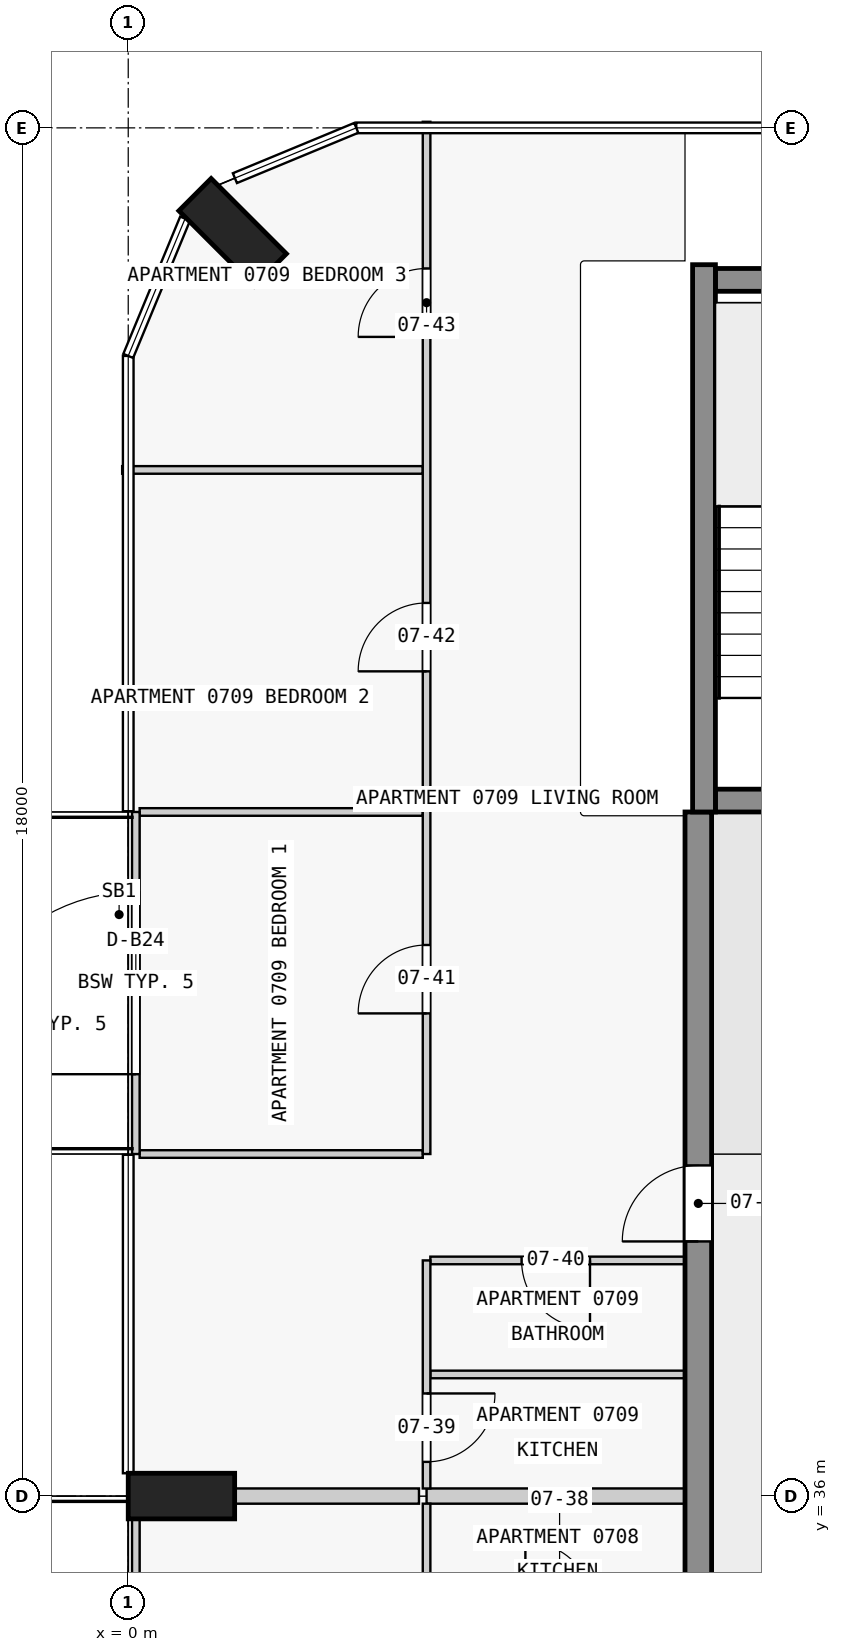
"""IFC4 building model, lengths in metres.
Left out: names, types, materials, properties, quantities, classifications, styles, units other than length and angle.
Written with IfcOpenShell. Run it as: python <this file> out.ifc"""

import sys

from ifc_helpers import new_model, si_unit, direction, frame, frame_2d, origin, origin_2d, place, context, subcontext, project, spatial, rectangle, extrude, element, fill, save


model = new_model("IFC4")
c1 = context("Model", 3, precision=1e-05, world=origin(), true_north=direction((0.0, 1.0)))
c2 = subcontext(c1, "Body", "Model", "MODEL_VIEW")
j1 = project(units=[si_unit("LENGTHUNIT", "METRE"), si_unit("PLANEANGLEUNIT", "RADIAN")], contexts=[c1])
p1 = place(None, origin())
s1 = spatial("IfcSite", under=j1, at=p1, CompositionType="ELEMENT")
p2 = place(p1, origin())
s2 = spatial("IfcBuilding", under=s1, at=p2, CompositionType="ELEMENT")
p3 = place(p2, frame((0.0, 0.0, 33.8)))
s3 = spatial("IfcBuildingStorey", under=s2, at=p3, CompositionType="ELEMENT", Elevation=33.8)
for number, where, z_axis, x_axis in (
    (1, (1.374, 52.626, 0.0), (0.0, 0.0, 1.0), (0.707, 0.707, 0.0)),
    (2, (0.7, 36.0, 0.0), (0.0, 0.0, 1.0), (0.0, 1.0, 0.0)),
):
    element("IfcColumn", number, at=place(p3, frame(where, z_axis=z_axis, x_axis=x_axis)), inside=s3, PredefinedType="COLUMN", context=c2, shape_type="SweptSolid", body=[
        extrude(rectangle(XDim=0.6, YDim=1.4, at=origin_2d()), origin(), (0.0, 0.0, 1.0), 3.5),
    ])
p4 = place(p3, frame((7.725, 45.15, 0.0), z_axis=(0.0, 0.0, 1.0), x_axis=(1.0, 0.0, 0.0)))
e3 = element("IfcWall", 3, at=p4, inside=s3, PredefinedType="SHEAR", context=c2, shape_type="SweptSolid", body=[
    extrude(rectangle(XDim=2.55, YDim=0.3, at=frame_2d((1.275, 0.0))), origin(), (0.0, 0.0, 1.0), 3.5),
])
p5 = place(p4, frame((0.725, 0.0, 0.0)))
e4 = element("IfcOpeningElement", 4, at=p5, cuts=e3, PredefinedType="OPENING", context=c2, shape_type="SweptSolid", body=[
    extrude(rectangle(XDim=1.1, YDim=2.1, at=frame_2d((0.55, 1.05))), frame((0.0, 0.16, 0.0), z_axis=(0.0, -1.0, 0.0), x_axis=(1.0, 0.0, 0.0)), (0.0, 0.0, 1.0), 0.32),
])
p6 = place(p3, frame((7.725, 52.0, 0.0), z_axis=(0.0, 0.0, 1.0), x_axis=(1.0, 0.0, 0.0)))
e5 = element("IfcWall", 5, at=p6, inside=s3, PredefinedType="SHEAR", context=c2, shape_type="SweptSolid", body=[
    extrude(rectangle(XDim=2.55, YDim=0.3, at=frame_2d((1.275, 0.0))), origin(), (0.0, 0.0, 1.0), 3.5),
])
p7 = place(p3, frame((7.575, 45.0, 0.0), z_axis=(0.0, 0.0, 1.0), x_axis=(0.0, 1.0, 0.0)))
e6 = element("IfcWall", 6, at=p7, inside=s3, PredefinedType="SHEAR", context=c2, shape_type="SweptSolid", body=[
    extrude(rectangle(XDim=7.2, YDim=0.3, at=frame_2d((3.6, 0.0))), origin(), (0.0, 0.0, 1.0), 3.5),
])
p8 = place(p3, frame((7.5, 18.0, 0.0), z_axis=(0.0, 0.0, 1.0), x_axis=(0.0, 1.0, 0.0)))
e7 = element("IfcWall", 7, at=p8, inside=s3, PredefinedType="SHEAR", context=c2, shape_type="SweptSolid", body=[
    extrude(rectangle(XDim=27.0, YDim=0.35, at=frame_2d((13.5, 0.0))), origin(), (0.0, 0.0, 1.0), 3.25),
])
p9 = place(p8, frame((1.75, 0.0, 0.0)))
e8 = element("IfcOpeningElement", 8, at=p9, cuts=e7, PredefinedType="OPENING", context=c2, shape_type="SweptSolid", body=[
    extrude(rectangle(XDim=1.0, YDim=2.1, at=frame_2d((0.5, 1.05))), frame((0.0, 0.185, 0.0), z_axis=(0.0, -1.0, 0.0), x_axis=(1.0, 0.0, 0.0)), (0.0, 0.0, 1.0), 0.37),
])
p10 = place(p8, frame((8.55, 0.0, 0.0)))
e9 = element("IfcOpeningElement", 9, at=p10, cuts=e7, PredefinedType="OPENING", context=c2, shape_type="SweptSolid", body=[
    extrude(rectangle(XDim=1.0, YDim=2.1, at=frame_2d((0.5, 1.05))), frame((0.0, 0.185, 0.0), z_axis=(0.0, -1.0, 0.0), x_axis=(1.0, 0.0, 0.0)), (0.0, 0.0, 1.0), 0.37),
])
p11 = place(p8, frame((15.25, 0.0, 0.0)))
e10 = element("IfcOpeningElement", 10, at=p11, cuts=e7, PredefinedType="OPENING", context=c2, shape_type="SweptSolid", body=[
    extrude(rectangle(XDim=1.0, YDim=2.1, at=frame_2d((0.5, 1.05))), frame((0.0, 0.185, 0.0), z_axis=(0.0, -1.0, 0.0), x_axis=(1.0, 0.0, 0.0)), (0.0, 0.0, 1.0), 0.37),
])
p12 = place(p8, frame((21.35, 0.0, 0.0)))
e11 = element("IfcOpeningElement", 11, at=p12, cuts=e7, PredefinedType="OPENING", context=c2, shape_type="SweptSolid", body=[
    extrude(rectangle(XDim=1.0, YDim=2.1, at=frame_2d((0.5, 1.05))), frame((0.0, 0.185, 0.0), z_axis=(0.0, -1.0, 0.0), x_axis=(1.0, 0.0, 0.0)), (0.0, 0.0, 1.0), 0.37),
])
p13 = place(p3, frame((0.1, 31.5, 0.0), z_axis=(0.0, 0.0, 1.0), x_axis=(0.0, 1.0, 0.0)))
e12 = element("IfcWall", 12, at=p13, inside=s3, PredefinedType="STANDARD", context=c2, shape_type="SweptSolid", body=[
    extrude(rectangle(XDim=4.5, YDim=0.1, at=frame_2d((2.25, 0.0))), origin(), (0.0, 0.0, 1.0), 3.25),
])
p14 = place(p13, frame((1.05, 0.0, 0.0)))
e13 = element("IfcOpeningElement", 13, at=p14, cuts=e12, PredefinedType="OPENING", context=c2, shape_type="SweptSolid", body=[
    extrude(rectangle(XDim=2.4, YDim=2.4, at=frame_2d((1.2, 1.2))), frame((0.0, 0.06, 0.0), z_axis=(0.0, -1.0, 0.0), x_axis=(1.0, 0.0, 0.0)), (0.0, 0.0, 1.0), 0.12),
])
p15 = place(p3, frame((0.1, 40.5, 0.0), z_axis=(0.0, 0.0, 1.0), x_axis=(0.0, 1.0, 0.0)))
e14 = element("IfcWall", 14, at=p15, inside=s3, PredefinedType="STANDARD", context=c2, shape_type="SweptSolid", body=[
    extrude(rectangle(XDim=4.5, YDim=0.1, at=frame_2d((2.25, 0.0))), origin(), (0.0, 0.0, 1.0), 3.25),
])
p16 = place(p15, frame((1.05, 0.0, 0.0)))
e15 = element("IfcOpeningElement", 15, at=p16, cuts=e14, PredefinedType="OPENING", context=c2, shape_type="SweptSolid", body=[
    extrude(rectangle(XDim=2.4, YDim=2.4, at=frame_2d((1.2, 1.2))), frame((0.0, 0.06, 0.0), z_axis=(0.0, -1.0, 0.0), x_axis=(1.0, 0.0, 0.0)), (0.0, 0.0, 1.0), 0.12),
])
p17 = place(p3, frame((7.325, 36.0, 0.0), z_axis=(0.0, 0.0, 1.0), x_axis=(-1.0, 0.0, 0.0)))
e16 = element("IfcWall", 16, at=p17, inside=s3, PredefinedType="PARTITIONING", context=c2, shape_type="SweptSolid", body=[
    extrude(rectangle(XDim=3.4, YDim=0.2, at=frame_2d((1.7, 0.0))), origin(), (0.0, 0.0, 1.0), 3.25),
])
p18 = place(p3, frame((1.4, 36.0, 0.0), z_axis=(0.0, 0.0, 1.0), x_axis=(1.0, 0.0, 0.0)))
e17 = element("IfcWall", 17, at=p18, inside=s3, PredefinedType="PARTITIONING", context=c2, shape_type="SweptSolid", body=[
    extrude(rectangle(XDim=2.425, YDim=0.2, at=frame_2d((1.212, 0.0))), origin(), (0.0, 0.0, 1.0), 3.25),
])
p19 = place(p3, frame((7.325, 37.6, 0.0), z_axis=(0.0, 0.0, 1.0), x_axis=(-1.0, 0.0, 0.0)))
e18 = element("IfcWall", 18, at=p19, inside=s3, PredefinedType="PARTITIONING", context=c2, shape_type="SweptSolid", body=[
    extrude(rectangle(XDim=3.35, YDim=0.1, at=frame_2d((1.675, 0.0))), origin(), (0.0, 0.0, 1.0), 3.25),
])
p20 = place(p3, frame((7.325, 39.1, 0.0), z_axis=(0.0, 0.0, 1.0), x_axis=(-1.0, 0.0, 0.0)))
e19 = element("IfcWall", 19, at=p20, inside=s3, PredefinedType="PARTITIONING", context=c2, shape_type="SweptSolid", body=[
    extrude(rectangle(XDim=3.35, YDim=0.1, at=frame_2d((1.675, 0.0))), origin(), (0.0, 0.0, 1.0), 3.25),
])
p21 = place(p20, frame((1.25, 0.0, 0.0)))
e20 = element("IfcOpeningElement", 20, at=p21, cuts=e19, PredefinedType="OPENING", context=c2, shape_type="SweptSolid", body=[
    extrude(rectangle(XDim=0.9, YDim=2.1, at=frame_2d((0.45, 1.05))), frame((0.0, 0.06, 0.0), z_axis=(0.0, -1.0, 0.0), x_axis=(1.0, 0.0, 0.0)), (0.0, 0.0, 1.0), 0.12),
])
for number, where, z_axis, x_axis in (
    (21, (0.15, 40.5, 0.0), (0.0, 0.0, 1.0), (1.0, 0.0, 0.0)),
    (22, (3.875, 45.0, 0.0), (0.0, 0.0, 1.0), (-1.0, 0.0, 0.0)),
):
    element("IfcWall", number, at=place(p3, frame(where, z_axis=z_axis, x_axis=x_axis)), inside=s3, PredefinedType="PARTITIONING", context=c2, shape_type="SweptSolid", body=[
        extrude(rectangle(XDim=3.725, YDim=0.1, at=frame_2d((1.863, 0.0))), origin(), (0.0, 0.0, 1.0), 3.25),
    ])
p22 = place(p3, frame((3.875, 49.5, 0.0), z_axis=(0.0, 0.0, 1.0), x_axis=(-1.0, 0.0, 0.0)))
e23 = element("IfcWall", 23, at=p22, inside=s3, PredefinedType="PARTITIONING", context=c2, shape_type="SweptSolid", body=[
    extrude(rectangle(XDim=3.955, YDim=0.1, at=frame_2d((1.978, 0.0))), origin(), (0.0, 0.0, 1.0), 3.25),
])
p23 = place(p3, frame((3.925, 35.9, 0.0), z_axis=(0.0, 0.0, 1.0), x_axis=(0.0, -1.0, 0.0)))
e24 = element("IfcWall", 24, at=p23, inside=s3, PredefinedType="PARTITIONING", context=c2, shape_type="SweptSolid", body=[
    extrude(rectangle(XDim=1.4, YDim=0.1, at=frame_2d((0.7, 0.0))), origin(), (0.0, 0.0, 1.0), 3.25),
])
p24 = place(p3, frame((3.925, 39.1, 0.0), z_axis=(0.0, 0.0, 1.0), x_axis=(0.0, -1.0, 0.0)))
e25 = element("IfcWall", 25, at=p24, inside=s3, PredefinedType="PARTITIONING", context=c2, shape_type="SweptSolid", body=[
    extrude(rectangle(XDim=3.0, YDim=0.1, at=frame_2d((1.5, 0.0))), origin(), (0.0, 0.0, 1.0), 3.25),
])
p25 = place(p24, frame((1.75, 0.0, 0.0)))
e26 = element("IfcOpeningElement", 26, at=p25, cuts=e25, PredefinedType="OPENING", context=c2, shape_type="SweptSolid", body=[
    extrude(rectangle(XDim=0.9, YDim=2.1, at=frame_2d((0.45, 1.05))), frame((0.0, 0.06, 0.0), z_axis=(0.0, -1.0, 0.0), x_axis=(1.0, 0.0, 0.0)), (0.0, 0.0, 1.0), 0.12),
])
p26 = place(p3, frame((3.925, 40.5, 0.0), z_axis=(0.0, 0.0, 1.0), x_axis=(0.0, 1.0, 0.0)))
e27 = element("IfcWall", 27, at=p26, inside=s3, PredefinedType="PARTITIONING", context=c2, shape_type="SweptSolid", body=[
    extrude(rectangle(XDim=13.58, YDim=0.1, at=frame_2d((6.79, 0.0))), origin(), (0.0, 0.0, 1.0), 3.25),
])
p27 = place(p26, frame((1.85, 0.0, 0.0)))
e28 = element("IfcOpeningElement", 28, at=p27, cuts=e27, PredefinedType="OPENING", context=c2, shape_type="SweptSolid", body=[
    extrude(rectangle(XDim=0.9, YDim=2.1, at=frame_2d((0.45, 1.05))), frame((0.0, 0.06, 0.0), z_axis=(0.0, -1.0, 0.0), x_axis=(1.0, 0.0, 0.0)), (0.0, 0.0, 1.0), 0.12),
])
p28 = place(p26, frame((6.35, 0.0, 0.0)))
e29 = element("IfcOpeningElement", 29, at=p28, cuts=e27, PredefinedType="OPENING", context=c2, shape_type="SweptSolid", body=[
    extrude(rectangle(XDim=0.9, YDim=2.1, at=frame_2d((0.45, 1.05))), frame((0.0, 0.06, 0.0), z_axis=(0.0, -1.0, 0.0), x_axis=(1.0, 0.0, 0.0)), (0.0, 0.0, 1.0), 0.12),
])
p29 = place(p26, frame((10.75, 0.0, 0.0)))
e30 = element("IfcOpeningElement", 30, at=p29, cuts=e27, PredefinedType="OPENING", context=c2, shape_type="SweptSolid", body=[
    extrude(rectangle(XDim=0.9, YDim=2.1, at=frame_2d((0.45, 1.05))), frame((0.0, 0.06, 0.0), z_axis=(0.0, -1.0, 0.0), x_axis=(1.0, 0.0, 0.0)), (0.0, 0.0, 1.0), 0.12),
])
p30 = place(p16, origin())
e31 = element("IfcDoor", 31, at=p30, inside=s3, OperationType="SINGLE_SWING_LEFT", PredefinedType="DOOR", context=c2, shape_type="SweptSolid", body=[
    extrude(rectangle(XDim=2.4, YDim=2.4, at=frame_2d((1.2, 1.2))), frame((0.0, 0.025, 0.0), z_axis=(0.0, -1.0, 0.0), x_axis=(1.0, 0.0, 0.0)), (0.0, 0.0, 1.0), 0.05),
])
fill(e15, e31)
p31 = place(p12, origin())
e32 = element("IfcDoor", 32, at=p31, inside=s3, OperationType="SINGLE_SWING_RIGHT", PredefinedType="DOOR", context=c2, shape_type="SweptSolid", body=[
    extrude(rectangle(XDim=1.0, YDim=2.1, at=frame_2d((0.5, 1.05))), frame((0.0, 0.025, 0.0), z_axis=(0.0, -1.0, 0.0), x_axis=(1.0, 0.0, 0.0)), (0.0, 0.0, 1.0), 0.05),
])
fill(e11, e32)
p32 = place(p25, origin())
e33 = element("IfcDoor", 33, at=p32, inside=s3, OperationType="SINGLE_SWING_RIGHT", PredefinedType="DOOR", context=c2, shape_type="SweptSolid", body=[
    extrude(rectangle(XDim=0.9, YDim=2.1, at=frame_2d((0.45, 1.05))), frame((0.0, 0.025, 0.0), z_axis=(0.0, -1.0, 0.0), x_axis=(1.0, 0.0, 0.0)), (0.0, 0.0, 1.0), 0.05),
])
fill(e26, e33)
p33 = place(p21, origin())
e34 = element("IfcDoor", 34, at=p33, inside=s3, OperationType="SINGLE_SWING_RIGHT", PredefinedType="DOOR", context=c2, shape_type="SweptSolid", body=[
    extrude(rectangle(XDim=0.9, YDim=2.1, at=frame_2d((0.45, 1.05))), frame((0.0, 0.025, 0.0), z_axis=(0.0, -1.0, 0.0), x_axis=(1.0, 0.0, 0.0)), (0.0, 0.0, 1.0), 0.05),
])
fill(e20, e34)
p34 = place(p27, origin())
e35 = element("IfcDoor", 35, at=p34, inside=s3, OperationType="SINGLE_SWING_LEFT", PredefinedType="DOOR", context=c2, shape_type="SweptSolid", body=[
    extrude(rectangle(XDim=0.9, YDim=2.1, at=frame_2d((0.45, 1.05))), frame((0.0, 0.025, 0.0), z_axis=(0.0, -1.0, 0.0), x_axis=(1.0, 0.0, 0.0)), (0.0, 0.0, 1.0), 0.05),
])
fill(e28, e35)
p35 = place(p28, origin())
e36 = element("IfcDoor", 36, at=p35, inside=s3, OperationType="SINGLE_SWING_RIGHT", PredefinedType="DOOR", context=c2, shape_type="SweptSolid", body=[
    extrude(rectangle(XDim=0.9, YDim=2.1, at=frame_2d((0.45, 1.05))), frame((0.0, 0.025, 0.0), z_axis=(0.0, -1.0, 0.0), x_axis=(1.0, 0.0, 0.0)), (0.0, 0.0, 1.0), 0.05),
])
fill(e29, e36)
p36 = place(p29, origin())
e37 = element("IfcDoor", 37, at=p36, inside=s3, OperationType="SINGLE_SWING_RIGHT", PredefinedType="DOOR", context=c2, shape_type="SweptSolid", body=[
    extrude(rectangle(XDim=0.9, YDim=2.1, at=frame_2d((0.45, 1.05))), frame((0.0, 0.025, 0.0), z_axis=(0.0, -1.0, 0.0), x_axis=(1.0, 0.0, 0.0)), (0.0, 0.0, 1.0), 0.05),
])
fill(e30, e37)
save(model, sys.argv[1])
